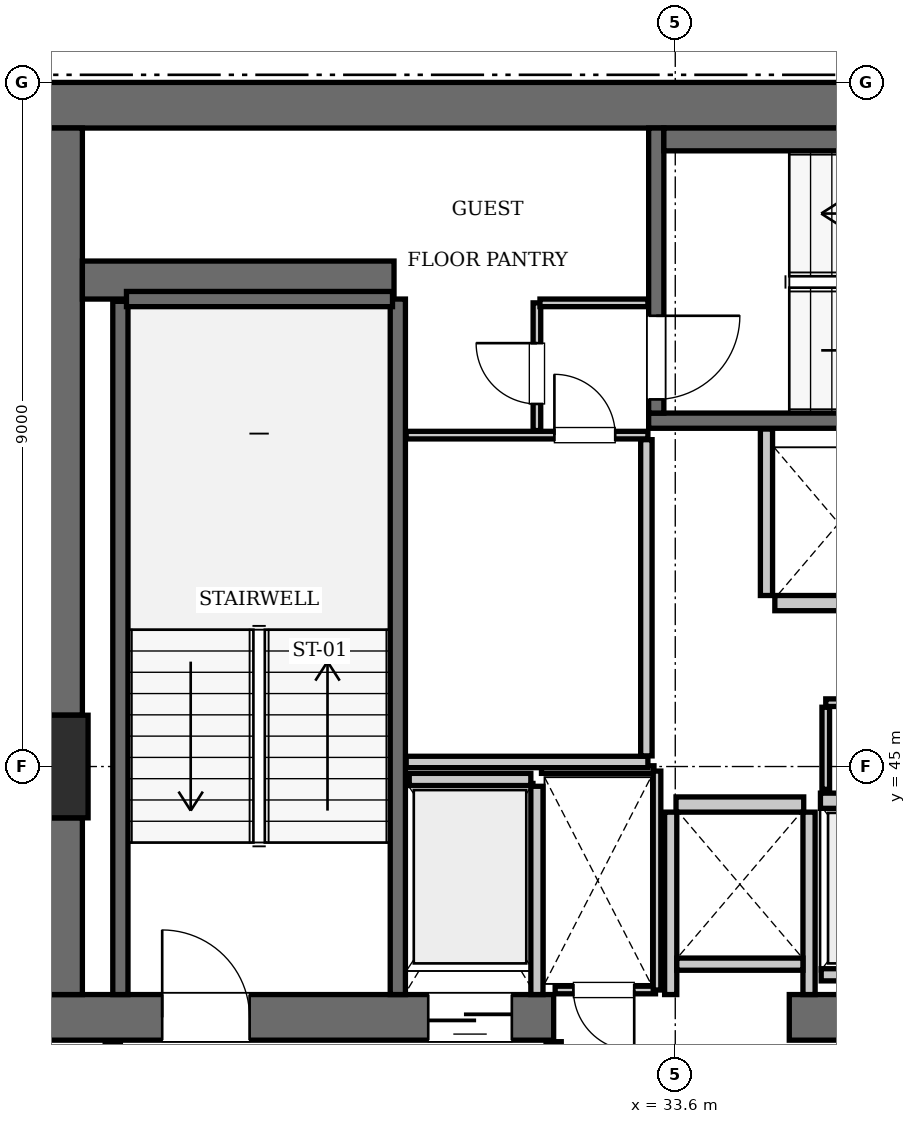
"""IFC4 building model, lengths in metres.
Left out: names, types, materials, properties, quantities, classifications, styles, units other than length and angle.
Written with IfcOpenShell. Run it as: python <this file> out.ifc"""

import sys

from ifc_helpers import new_model, si_unit, direction, frame, frame_2d, origin, origin_2d, place, context, subcontext, project, spatial, rectangle, extrude, element, fill, save


model = new_model("IFC4")
c1 = context("Model", 3, precision=1e-05, world=origin(), true_north=direction((0.0, 1.0)))
c2 = subcontext(c1, "Body", "Model", "MODEL_VIEW")
j1 = project(units=[si_unit("LENGTHUNIT", "METRE"), si_unit("PLANEANGLEUNIT", "RADIAN")], contexts=[c1])
p1 = place(None, origin())
s1 = spatial("IfcSite", under=j1, at=p1, CompositionType="ELEMENT")
p2 = place(p1, origin())
s2 = spatial("IfcBuilding", under=s1, at=p2, CompositionType="ELEMENT")
p3 = place(p2, frame((0.0, 0.0, 337.4)))
s3 = spatial("IfcBuildingStorey", under=s2, at=p3, CompositionType="ELEMENT", Elevation=337.4)
p4 = place(p3, frame((25.2, 45.0, 0.0), z_axis=(0.0, 0.0, 1.0), x_axis=(1.0, 0.0, 0.0)))
e1 = element("IfcColumn", 1, at=p4, inside=s3, PredefinedType="COLUMN", context=c2, shape_type="SweptSolid", body=[
    extrude(rectangle(XDim=1.35, YDim=1.35, at=origin_2d()), origin(), (0.0, 0.0, 1.0), 3.85),
])
p5 = place(p3, frame((25.2, 53.7, 0.0), z_axis=(0.0, 0.0, 1.0), x_axis=(1.0, 0.0, 0.0)))
e2 = element("IfcWall", 2, at=p5, inside=s3, PredefinedType="SHEAR", context=c2, shape_type="SweptSolid", body=[
    extrude(rectangle(XDim=25.2, YDim=0.6, at=frame_2d((12.6, 0.0))), origin(), (0.0, 0.0, 1.0), 3.85),
])
p6 = place(p3, frame((25.2, 41.7, 0.0), z_axis=(0.0, 0.0, 1.0), x_axis=(1.0, 0.0, 0.0)))
e3 = element("IfcWall", 3, at=p6, inside=s3, PredefinedType="SHEAR", context=c2, shape_type="SweptSolid", body=[
    extrude(rectangle(XDim=6.8, YDim=0.6, at=frame_2d((3.4, 0.0))), origin(), (0.0, 0.0, 1.0), 3.85),
])
p7 = place(p6, frame((1.65, 0.0, 0.0)))
e4 = element("IfcOpeningElement", 4, at=p7, cuts=e3, PredefinedType="OPENING", context=c2, shape_type="SweptSolid", body=[
    extrude(rectangle(XDim=1.15, YDim=2.15, at=frame_2d((0.575, 1.075))), frame((0.0, 0.31, 0.0), z_axis=(0.0, -1.0, 0.0), x_axis=(1.0, 0.0, 0.0)), (0.0, 0.0, 1.0), 0.62),
])
p8 = place(p6, frame((5.15, 0.0, 0.0)))
e5 = element("IfcOpeningElement", 5, at=p8, cuts=e3, PredefinedType="OPENING", context=c2, shape_type="SweptSolid", body=[
    extrude(rectangle(XDim=1.1, YDim=2.2, at=frame_2d((0.55, 1.1))), frame((0.0, 0.31, 0.0), z_axis=(0.0, -1.0, 0.0), x_axis=(1.0, 0.0, 0.0)), (0.0, 0.0, 1.0), 0.62),
])
p9 = place(p3, frame((35.1, 41.7, 0.0), z_axis=(0.0, 0.0, 1.0), x_axis=(1.0, 0.0, 0.0)))
e6 = element("IfcWall", 6, at=p9, inside=s3, PredefinedType="SHEAR", context=c2, shape_type="SweptSolid", body=[
    extrude(rectangle(XDim=5.4, YDim=0.6, at=frame_2d((2.7, 0.0))), origin(), (0.0, 0.0, 1.0), 3.85),
])
p10 = place(p3, frame((25.5, 42.0, 0.0), z_axis=(0.0, 0.0, 1.0), x_axis=(0.0, 1.0, 0.0)))
e7 = element("IfcWall", 7, at=p10, inside=s3, PredefinedType="SHEAR", context=c2, shape_type="SweptSolid", body=[
    extrude(rectangle(XDim=2.325, YDim=0.6, at=frame_2d((1.163, 0.0))), origin(), (0.0, 0.0, 1.0), 3.85),
])
p11 = place(p3, frame((25.5, 45.675, 0.0), z_axis=(0.0, 0.0, 1.0), x_axis=(0.0, 1.0, 0.0)))
e8 = element("IfcWall", 8, at=p11, inside=s3, PredefinedType="SHEAR", context=c2, shape_type="SweptSolid", body=[
    extrude(rectangle(XDim=7.725, YDim=0.6, at=frame_2d((3.862, 0.0))), origin(), (0.0, 0.0, 1.0), 3.85),
])
p12 = place(p3, frame((25.8, 51.4, 0.0), z_axis=(0.0, 0.0, 1.0), x_axis=(1.0, 0.0, 0.0)))
e9 = element("IfcWall", 9, at=p12, inside=s3, PredefinedType="SHEAR", context=c2, shape_type="SweptSolid", body=[
    extrude(rectangle(XDim=4.1, YDim=0.5, at=frame_2d((2.05, 0.0))), origin(), (0.0, 0.0, 1.0), 3.85),
])
p13 = place(p3, frame((29.95, 42.0, 0.0), z_axis=(0.0, 0.0, 1.0), x_axis=(0.0, 1.0, 0.0)))
e10 = element("IfcWall", 10, at=p13, inside=s3, PredefinedType="SOLIDWALL", context=c2, shape_type="SweptSolid", body=[
    extrude(rectangle(XDim=9.15, YDim=0.2, at=frame_2d((4.575, 0.0))), origin(), (0.0, 0.0, 1.0), 3.61),
])
p14 = place(p3, frame((26.3, 42.0, 0.0), z_axis=(0.0, 0.0, 1.0), x_axis=(0.0, 1.0, 0.0)))
e11 = element("IfcWall", 11, at=p14, inside=s3, PredefinedType="SOLIDWALL", context=c2, shape_type="SweptSolid", body=[
    extrude(rectangle(XDim=9.12, YDim=0.2, at=frame_2d((4.56, 0.0))), origin(), (0.0, 0.0, 1.0), 3.61),
])
p15 = place(p3, frame((26.38, 51.15, 0.0), z_axis=(0.0, 0.0, 1.0), x_axis=(1.0, 0.0, 0.0)))
e12 = element("IfcWall", 12, at=p15, inside=s3, PredefinedType="SOLIDWALL", context=c2, shape_type="SweptSolid", body=[
    extrude(rectangle(XDim=3.5, YDim=0.2, at=frame_2d((1.75, 0.0))), origin(), (0.0, 0.0, 1.0), 3.61),
])
p16 = place(p3, frame((33.25, 49.55, 0.0), z_axis=(0.0, 0.0, 1.0), x_axis=(1.0, 0.0, 0.0)))
e13 = element("IfcWall", 13, at=p16, inside=s3, PredefinedType="SOLIDWALL", context=c2, shape_type="SweptSolid", body=[
    extrude(rectangle(XDim=9.1, YDim=0.2, at=frame_2d((4.55, 0.0))), origin(), (0.0, 0.0, 1.0), 3.61),
])
p17 = place(p3, frame((33.35, 49.65, 0.0), z_axis=(0.0, 0.0, 1.0), x_axis=(0.0, 1.0, 0.0)))
e14 = element("IfcWall", 14, at=p17, inside=s3, PredefinedType="SOLIDWALL", context=c2, shape_type="SweptSolid", body=[
    extrude(rectangle(XDim=3.75, YDim=0.2, at=frame_2d((1.875, 0.0))), origin(), (0.0, 0.0, 1.0), 3.61),
])
p18 = place(p17, frame((0.18, 0.0, 0.0)))
e15 = element("IfcOpeningElement", 15, at=p18, cuts=e14, PredefinedType="OPENING", context=c2, shape_type="SweptSolid", body=[
    extrude(rectangle(XDim=1.1, YDim=2.15, at=frame_2d((0.55, 1.075))), frame((0.0, 0.11, 0.0), z_axis=(0.0, -1.0, 0.0), x_axis=(1.0, 0.0, 0.0)), (0.0, 0.0, 1.0), 0.22),
])
p19 = place(p3, frame((33.45, 53.25, 0.0), z_axis=(0.0, 0.0, 1.0), x_axis=(1.0, 0.0, 0.0)))
e16 = element("IfcWall", 16, at=p19, inside=s3, PredefinedType="SOLIDWALL", context=c2, shape_type="SweptSolid", body=[
    extrude(rectangle(XDim=8.7, YDim=0.3, at=frame_2d((4.35, 0.0))), origin(), (0.0, 0.0, 1.0), 3.61),
])
p20 = place(p3, frame((35.51, 44.55, 0.0), z_axis=(0.0, 0.0, 1.0), x_axis=(1.0, 0.0, 0.0)))
e17 = element("IfcWall", 17, at=p20, inside=s3, PredefinedType="SOLIDWALL", context=c2, shape_type="SweptSolid", body=[
    extrude(rectangle(XDim=1.68, YDim=0.2, at=frame_2d((0.84, 0.0))), origin(), (0.0, 0.0, 1.0), 3.61),
])
p21 = place(p20, frame((0.34, 0.0, 0.0)))
e18 = element("IfcOpeningElement", 18, at=p21, cuts=e17, PredefinedType="OPENING", context=c2, shape_type="SweptSolid", body=[
    extrude(rectangle(XDim=1.0, YDim=2.15, at=frame_2d((0.5, 1.075))), frame((0.0, 0.11, 0.0), z_axis=(0.0, -1.0, 0.0), x_axis=(1.0, 0.0, 0.0)), (0.0, 0.0, 1.0), 0.22),
])
p22 = place(p3, frame((34.91, 47.15, 0.0), z_axis=(0.0, 0.0, 1.0), x_axis=(1.0, 0.0, 0.0)))
e19 = element("IfcWall", 19, at=p22, inside=s3, PredefinedType="SOLIDWALL", context=c2, shape_type="SweptSolid", body=[
    extrude(rectangle(XDim=1.68, YDim=0.2, at=frame_2d((0.84, 0.0))), origin(), (0.0, 0.0, 1.0), 3.61),
])
p23 = place(p3, frame((33.61, 44.5, 0.0), z_axis=(0.0, 0.0, 1.0), x_axis=(1.0, 0.0, 0.0)))
e20 = element("IfcWall", 20, at=p23, inside=s3, PredefinedType="SOLIDWALL", context=c2, shape_type="SweptSolid", body=[
    extrude(rectangle(XDim=1.68, YDim=0.2, at=frame_2d((0.84, 0.0))), origin(), (0.0, 0.0, 1.0), 3.61),
])
p24 = place(p3, frame((30.1, 44.83, 0.0), z_axis=(0.0, 0.0, 1.0), x_axis=(1.0, 0.0, 0.0)))
e21 = element("IfcWall", 21, at=p24, inside=s3, PredefinedType="SOLIDWALL", context=c2, shape_type="SweptSolid", body=[
    extrude(rectangle(XDim=1.6, YDim=0.16, at=frame_2d((0.8, 0.0))), origin(), (0.0, 0.0, 1.0), 3.61),
])
p25 = place(p3, frame((31.78, 42.0, 0.0), z_axis=(0.0, 0.0, 1.0), x_axis=(0.0, 1.0, 0.0)))
e22 = element("IfcWall", 22, at=p25, inside=s3, PredefinedType="SOLIDWALL", context=c2, shape_type="SweptSolid", body=[
    extrude(rectangle(XDim=2.74, YDim=0.16, at=frame_2d((1.37, 0.0))), origin(), (0.0, 0.0, 1.0), 3.61),
])
p26 = place(p3, frame((35.52, 42.26, 0.0), z_axis=(0.0, 0.0, 1.0), x_axis=(1.0, 0.0, 0.0)))
e23 = element("IfcWall", 23, at=p26, inside=s3, PredefinedType="SOLIDWALL", context=c2, shape_type="SweptSolid", body=[
    extrude(rectangle(XDim=5.02, YDim=0.16, at=frame_2d((2.51, 0.0))), origin(), (0.0, 0.0, 1.0), 3.61),
])
p27 = place(p3, frame((34.8, 47.25, 0.0), z_axis=(0.0, 0.0, 1.0), x_axis=(0.0, 1.0, 0.0)))
e24 = element("IfcWall", 24, at=p27, inside=s3, PredefinedType="SOLIDWALL", context=c2, shape_type="SweptSolid", body=[
    extrude(rectangle(XDim=2.19, YDim=0.16, at=frame_2d((1.095, 0.0))), origin(), (0.0, 0.0, 1.0), 3.61),
])
for number, where, z_axis, x_axis in (
    (25, (33.54, 42.0, 0.0), (0.0, 0.0, 1.0), (0.0, 1.0, 0.0)),
    (26, (35.36, 42.0, 0.0), (0.0, 0.0, 1.0), (0.0, 1.0, 0.0)),
):
    element("IfcWall", number, at=place(p3, frame(where, z_axis=z_axis, x_axis=x_axis)), inside=s3, PredefinedType="SOLIDWALL", context=c2, shape_type="SweptSolid", body=[
        extrude(rectangle(XDim=2.4, YDim=0.16, at=frame_2d((1.2, 0.0))), origin(), (0.0, 0.0, 1.0), 3.61),
    ])
p28 = place(p3, frame((33.62, 42.4, 0.0), z_axis=(0.0, 0.0, 1.0), x_axis=(1.0, 0.0, 0.0)))
e27 = element("IfcWall", 27, at=p28, inside=s3, PredefinedType="SOLIDWALL", context=c2, shape_type="SweptSolid", body=[
    extrude(rectangle(XDim=1.66, YDim=0.16, at=frame_2d((0.83, 0.0))), origin(), (0.0, 0.0, 1.0), 3.61),
])
for number, where, z_axis, x_axis in (
    (28, (26.2, 38.31, 0.0), (0.0, 0.0, 1.0), (0.0, 1.0, 0.0)),
    (29, (32.0, 38.31, 0.0), (0.0, 0.0, 1.0), (0.0, 1.0, 0.0)),
):
    element("IfcWall", number, at=place(p3, frame(where, z_axis=z_axis, x_axis=x_axis)), inside=s3, PredefinedType="PARTITIONING", context=c2, shape_type="SweptSolid", body=[
        extrude(rectangle(XDim=3.07, YDim=0.2, at=frame_2d((1.535, 0.0))), origin(), (0.0, 0.0, 1.0), 3.61),
    ])
p29 = place(p3, frame((32.02, 42.06, 0.0), z_axis=(0.0, 0.0, 1.0), x_axis=(1.0, 0.0, 0.0)))
e30 = element("IfcWall", 30, at=p29, inside=s3, PredefinedType="PARTITIONING", context=c2, shape_type="SweptSolid", body=[
    extrude(rectangle(XDim=1.32, YDim=0.1, at=frame_2d((0.66, 0.0))), origin(), (0.0, 0.0, 1.0), 3.61),
])
p30 = place(p29, frame((0.24, 0.0, 0.0)))
e31 = element("IfcOpeningElement", 31, at=p30, cuts=e30, PredefinedType="OPENING", context=c2, shape_type="SweptSolid", body=[
    extrude(rectangle(XDim=0.8, YDim=2.05, at=frame_2d((0.4, 1.025))), frame((0.0, 0.06, 0.0), z_axis=(0.0, -1.0, 0.0), x_axis=(1.0, 0.0, 0.0)), (0.0, 0.0, 1.0), 0.12),
])
p31 = place(p3, frame((31.84, 44.96, 0.0), z_axis=(0.0, 0.0, 1.0), x_axis=(1.0, 0.0, 0.0)))
e32 = element("IfcWall", 32, at=p31, inside=s3, PredefinedType="PARTITIONING", context=c2, shape_type="SweptSolid", body=[
    extrude(rectangle(XDim=1.48, YDim=0.1, at=frame_2d((0.74, 0.0))), origin(), (0.0, 0.0, 1.0), 3.61),
])
p32 = place(p3, frame((33.36, 42.06, 0.0), z_axis=(0.0, 0.0, 1.0), x_axis=(0.0, 1.0, 0.0)))
e33 = element("IfcWall", 33, at=p32, inside=s3, PredefinedType="PARTITIONING", context=c2, shape_type="SweptSolid", body=[
    extrude(rectangle(XDim=2.88, YDim=0.1, at=frame_2d((1.44, 0.0))), origin(), (0.0, 0.0, 1.0), 3.61),
])
p33 = place(p3, frame((35.58, 45.84, 0.0), z_axis=(0.0, 0.0, 1.0), x_axis=(1.0, 0.0, 0.0)))
e34 = element("IfcWall", 34, at=p33, inside=s3, PredefinedType="PARTITIONING", context=c2, shape_type="SweptSolid", body=[
    extrude(rectangle(XDim=2.36, YDim=0.1, at=frame_2d((1.18, 0.0))), origin(), (0.0, 0.0, 1.0), 3.61),
])
p34 = place(p33, frame((0.7, 0.0, 0.0)))
e35 = element("IfcOpeningElement", 35, at=p34, cuts=e34, PredefinedType="OPENING", context=c2, shape_type="SweptSolid", body=[
    extrude(rectangle(XDim=0.8, YDim=2.05, at=frame_2d((0.4, 1.025))), frame((0.0, 0.06, 0.0), z_axis=(0.0, -1.0, 0.0), x_axis=(1.0, 0.0, 0.0)), (0.0, 0.0, 1.0), 0.12),
])
p35 = place(p3, frame((35.58, 44.7, 0.0), z_axis=(0.0, 0.0, 1.0), x_axis=(0.0, 1.0, 0.0)))
e36 = element("IfcWall", 36, at=p35, inside=s3, PredefinedType="PARTITIONING", context=c2, shape_type="SweptSolid", body=[
    extrude(rectangle(XDim=1.08, YDim=0.1, at=frame_2d((0.54, 0.0))), origin(), (0.0, 0.0, 1.0), 3.61),
])
p36 = place(p3, frame((30.06, 45.06, 0.0), z_axis=(0.0, 0.0, 1.0), x_axis=(1.0, 0.0, 0.0)))
e37 = element("IfcWall", 37, at=p36, inside=s3, PredefinedType="PARTITIONING", context=c2, shape_type="SweptSolid", body=[
    extrude(rectangle(XDim=3.18, YDim=0.15, at=frame_2d((1.59, 0.0))), origin(), (0.0, 0.0, 1.0), 3.61),
])
p37 = place(p3, frame((33.22, 45.14, 0.0), z_axis=(0.0, 0.0, 1.0), x_axis=(0.0, 1.0, 0.0)))
e38 = element("IfcWall", 38, at=p37, inside=s3, PredefinedType="PARTITIONING", context=c2, shape_type="SweptSolid", body=[
    extrude(rectangle(XDim=4.16, YDim=0.15, at=frame_2d((2.08, 0.0))), origin(), (0.0, 0.0, 1.0), 3.61),
])
p38 = place(p3, frame((30.06, 49.36, 0.0), z_axis=(0.0, 0.0, 1.0), x_axis=(1.0, 0.0, 0.0)))
e39 = element("IfcWall", 39, at=p38, inside=s3, PredefinedType="PARTITIONING", context=c2, shape_type="SweptSolid", body=[
    extrude(rectangle(XDim=3.18, YDim=0.1, at=frame_2d((1.59, 0.0))), origin(), (0.0, 0.0, 1.0), 3.61),
])
p39 = place(p38, frame((1.95, 0.0, 0.0)))
e40 = element("IfcOpeningElement", 40, at=p39, cuts=e39, PredefinedType="OPENING", context=c2, shape_type="SweptSolid", body=[
    extrude(rectangle(XDim=0.8, YDim=2.05, at=frame_2d((0.4, 1.025))), frame((0.0, 0.06, 0.0), z_axis=(0.0, -1.0, 0.0), x_axis=(1.0, 0.0, 0.0)), (0.0, 0.0, 1.0), 0.12),
])
p40 = place(p3, frame((31.78, 49.42, 0.0), z_axis=(0.0, 0.0, 1.0), x_axis=(0.0, 1.0, 0.0)))
e41 = element("IfcWall", 41, at=p40, inside=s3, PredefinedType="PARTITIONING", context=c2, shape_type="SweptSolid", body=[
    extrude(rectangle(XDim=1.68, YDim=0.1, at=frame_2d((0.84, 0.0))), origin(), (0.0, 0.0, 1.0), 3.61),
])
p41 = place(p40, frame((0.35, 0.0, 0.0)))
e42 = element("IfcOpeningElement", 42, at=p41, cuts=e41, PredefinedType="OPENING", context=c2, shape_type="SweptSolid", body=[
    extrude(rectangle(XDim=0.8, YDim=2.05, at=frame_2d((0.4, 1.025))), frame((0.0, 0.06, 0.0), z_axis=(0.0, -1.0, 0.0), x_axis=(1.0, 0.0, 0.0)), (0.0, 0.0, 1.0), 0.12),
])
p42 = place(p3, frame((31.82, 51.1, 0.0), z_axis=(0.0, 0.0, 1.0), x_axis=(1.0, 0.0, 0.0)))
e43 = element("IfcWall", 43, at=p42, inside=s3, PredefinedType="PARTITIONING", context=c2, shape_type="SweptSolid", body=[
    extrude(rectangle(XDim=1.42, YDim=0.1, at=frame_2d((0.71, 0.0))), origin(), (0.0, 0.0, 1.0), 3.61),
])
p43 = place(p7, origin())
e44 = element("IfcDoor", 44, at=p43, inside=s3, OperationType="SINGLE_SWING_LEFT", PredefinedType="DOOR", context=c2, shape_type="SweptSolid", body=[
    extrude(rectangle(XDim=1.15, YDim=2.15, at=frame_2d((0.575, 1.075))), frame((0.0, 0.025, 0.0), z_axis=(0.0, -1.0, 0.0), x_axis=(1.0, 0.0, 0.0)), (0.0, 0.0, 1.0), 0.05),
])
fill(e4, e44)
p44 = place(p18, frame((1.1, 0.0, 0.0), z_axis=(0.0, 0.0, 1.0), x_axis=(-1.0, 0.0, 0.0)))
e45 = element("IfcDoor", 45, at=p44, inside=s3, OperationType="SINGLE_SWING_LEFT", PredefinedType="DOOR", context=c2, shape_type="SweptSolid", body=[
    extrude(rectangle(XDim=1.1, YDim=2.15, at=frame_2d((0.55, 1.075))), frame((0.0, 0.025, 0.0), z_axis=(0.0, -1.0, 0.0), x_axis=(1.0, 0.0, 0.0)), (0.0, 0.0, 1.0), 0.05),
])
fill(e15, e45)
p45 = place(p8, frame((1.1, 0.0, 0.0), z_axis=(0.0, 0.0, 1.0), x_axis=(-1.0, 0.0, 0.0)))
e46 = element("IfcDoor", 46, at=p45, inside=s3, OperationType="SLIDING_TO_LEFT", PredefinedType="DOOR", context=c2, shape_type="SweptSolid", body=[
    extrude(rectangle(XDim=1.1, YDim=2.2, at=frame_2d((0.55, 1.1))), frame((0.0, 0.025, 0.0), z_axis=(0.0, -1.0, 0.0), x_axis=(1.0, 0.0, 0.0)), (0.0, 0.0, 1.0), 0.05),
])
fill(e5, e46)
p46 = place(p30, frame((0.8, 0.0, 0.0), z_axis=(0.0, 0.0, 1.0), x_axis=(-1.0, 0.0, 0.0)))
e47 = element("IfcDoor", 47, at=p46, inside=s3, OperationType="SINGLE_SWING_LEFT", PredefinedType="DOOR", context=c2, shape_type="SweptSolid", body=[
    extrude(rectangle(XDim=0.8, YDim=2.05, at=frame_2d((0.4, 1.025))), frame((0.0, 0.025, 0.0), z_axis=(0.0, -1.0, 0.0), x_axis=(1.0, 0.0, 0.0)), (0.0, 0.0, 1.0), 0.05),
])
fill(e31, e47)
p47 = place(p39, origin())
e48 = element("IfcDoor", 48, at=p47, inside=s3, OperationType="SINGLE_SWING_LEFT", PredefinedType="DOOR", context=c2, shape_type="SweptSolid", body=[
    extrude(rectangle(XDim=0.8, YDim=2.05, at=frame_2d((0.4, 1.025))), frame((0.0, 0.025, 0.0), z_axis=(0.0, -1.0, 0.0), x_axis=(1.0, 0.0, 0.0)), (0.0, 0.0, 1.0), 0.05),
])
fill(e40, e48)
p48 = place(p41, origin())
e49 = element("IfcDoor", 49, at=p48, inside=s3, OperationType="SINGLE_SWING_RIGHT", PredefinedType="DOOR", context=c2, shape_type="SweptSolid", body=[
    extrude(rectangle(XDim=0.8, YDim=2.05, at=frame_2d((0.4, 1.025))), frame((0.0, 0.025, 0.0), z_axis=(0.0, -1.0, 0.0), x_axis=(1.0, 0.0, 0.0)), (0.0, 0.0, 1.0), 0.05),
])
fill(e42, e49)
save(model, sys.argv[1])
